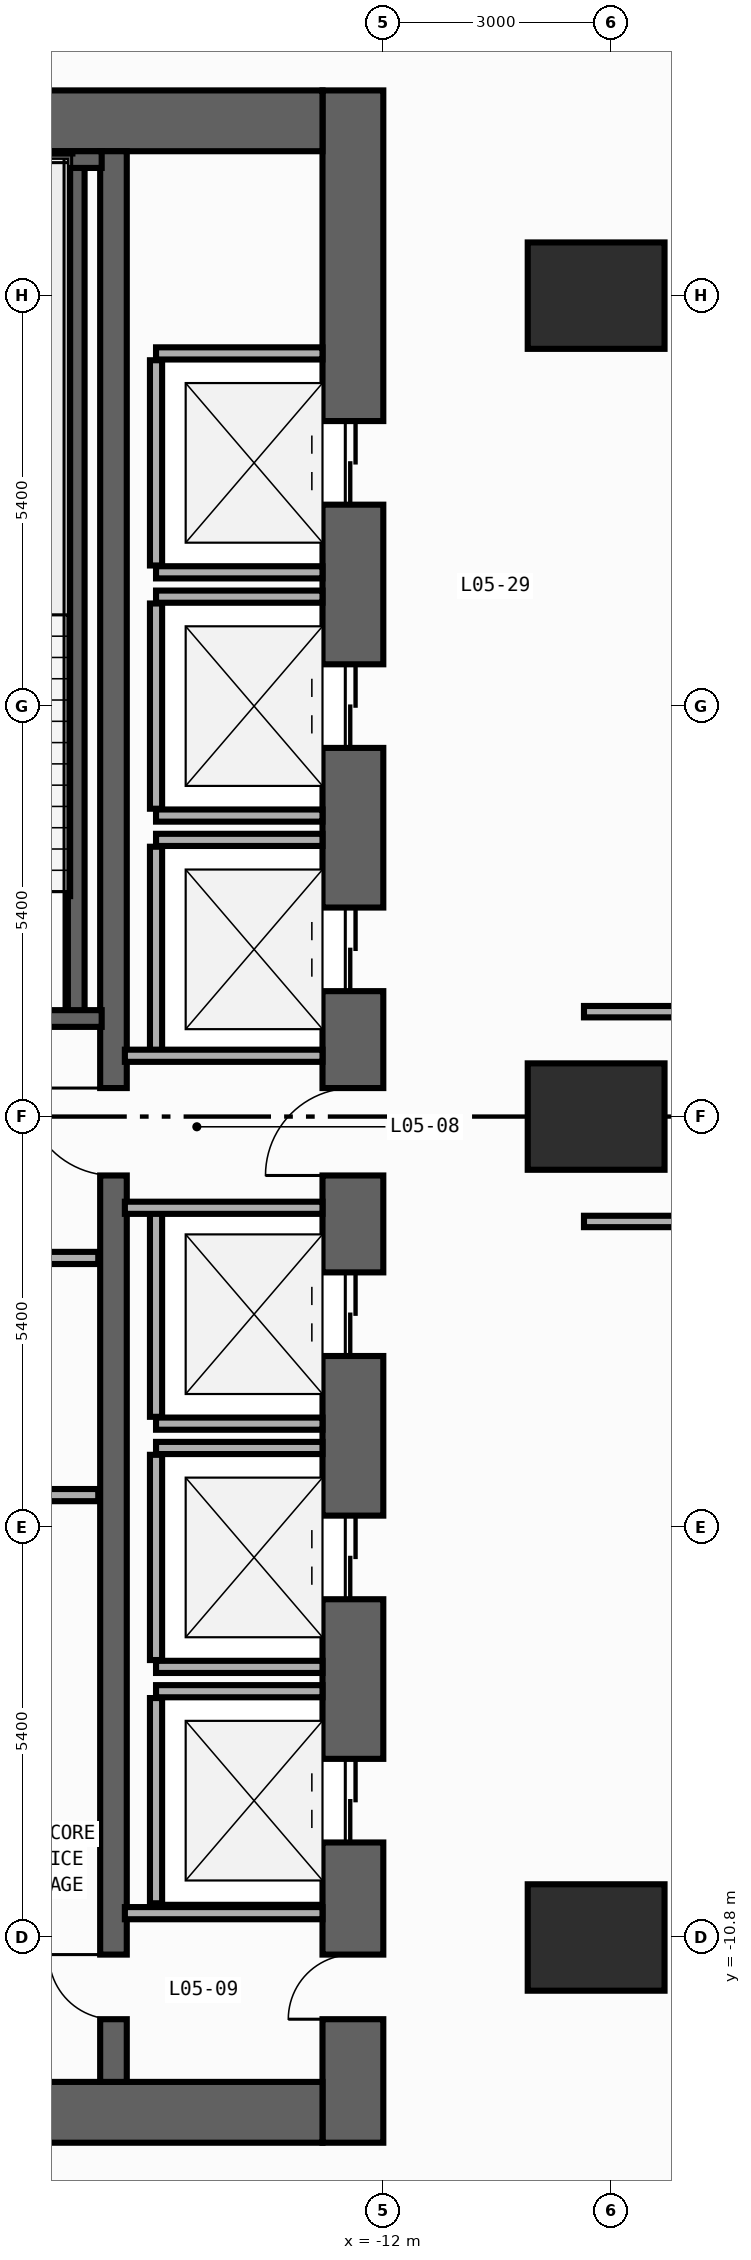
"""IFC4 building model, lengths in metres.
Left out: names, types, materials, properties, quantities, classifications, styles, units other than length and angle.
Written with IfcOpenShell. Run it as: python <this file> out.ifc"""

import sys

from ifc_helpers import new_model, si_unit, direction, frame, frame_2d, origin, origin_2d, place, context, subcontext, project, spatial, rectangle, extrude, element, fill, save


model = new_model("IFC4")
c1 = context("Model", 3, precision=1e-05, world=origin(), true_north=direction((0.0, 1.0)))
c2 = subcontext(c1, "Body", "Model", "MODEL_VIEW")
j1 = project(units=[si_unit("LENGTHUNIT", "METRE"), si_unit("PLANEANGLEUNIT", "RADIAN")], contexts=[c1])
p1 = place(None, origin())
s1 = spatial("IfcSite", under=j1, at=p1, CompositionType="ELEMENT")
p2 = place(p1, origin())
s2 = spatial("IfcBuilding", under=s1, at=p2, CompositionType="ELEMENT")
p3 = place(p2, frame((0.0, 0.0, 21.0)))
s3 = spatial("IfcBuildingStorey", under=s2, at=p3, CompositionType="ELEMENT", Elevation=21.0)
p4 = place(p3, frame((-12.4, -13.5, 0.0), z_axis=(0.0, 0.0, 1.0), x_axis=(0.0, 1.0, 0.0)))
e1 = element("IfcWall", 1, at=p4, inside=s3, PredefinedType="SHEAR", context=c2, shape_type="SweptSolid", body=[
    extrude(rectangle(XDim=27.0, YDim=0.8, at=frame_2d((13.5, 0.0))), origin(), (0.0, 0.0, 1.0), 4.74),
])
p5 = place(p4, frame((21.55, 0.0, 0.0)))
e2 = element("IfcOpeningElement", 2, at=p5, cuts=e1, PredefinedType="OPENING", context=c2, shape_type="SweptSolid", body=[
    extrude(rectangle(XDim=1.1, YDim=2.2, at=frame_2d((0.55, 1.1))), frame((0.0, 0.41, 0.0), z_axis=(0.0, -1.0, 0.0), x_axis=(1.0, 0.0, 0.0)), (0.0, 0.0, 1.0), 0.82),
])
p6 = place(p4, frame((18.35, 0.0, 0.0)))
e3 = element("IfcOpeningElement", 3, at=p6, cuts=e1, PredefinedType="OPENING", context=c2, shape_type="SweptSolid", body=[
    extrude(rectangle(XDim=1.1, YDim=2.2, at=frame_2d((0.55, 1.1))), frame((0.0, 0.41, 0.0), z_axis=(0.0, -1.0, 0.0), x_axis=(1.0, 0.0, 0.0)), (0.0, 0.0, 1.0), 0.82),
])
p7 = place(p4, frame((15.15, 0.0, 0.0)))
e4 = element("IfcOpeningElement", 4, at=p7, cuts=e1, PredefinedType="OPENING", context=c2, shape_type="SweptSolid", body=[
    extrude(rectangle(XDim=1.1, YDim=2.2, at=frame_2d((0.55, 1.1))), frame((0.0, 0.41, 0.0), z_axis=(0.0, -1.0, 0.0), x_axis=(1.0, 0.0, 0.0)), (0.0, 0.0, 1.0), 0.82),
])
p8 = place(p4, frame((10.35, 0.0, 0.0)))
e5 = element("IfcOpeningElement", 5, at=p8, cuts=e1, PredefinedType="OPENING", context=c2, shape_type="SweptSolid", body=[
    extrude(rectangle(XDim=1.1, YDim=2.2, at=frame_2d((0.55, 1.1))), frame((0.0, 0.41, 0.0), z_axis=(0.0, -1.0, 0.0), x_axis=(1.0, 0.0, 0.0)), (0.0, 0.0, 1.0), 0.82),
])
p9 = place(p4, frame((7.15, 0.0, 0.0)))
e6 = element("IfcOpeningElement", 6, at=p9, cuts=e1, PredefinedType="OPENING", context=c2, shape_type="SweptSolid", body=[
    extrude(rectangle(XDim=1.1, YDim=2.2, at=frame_2d((0.55, 1.1))), frame((0.0, 0.41, 0.0), z_axis=(0.0, -1.0, 0.0), x_axis=(1.0, 0.0, 0.0)), (0.0, 0.0, 1.0), 0.82),
])
p10 = place(p4, frame((3.95, 0.0, 0.0)))
e7 = element("IfcOpeningElement", 7, at=p10, cuts=e1, PredefinedType="OPENING", context=c2, shape_type="SweptSolid", body=[
    extrude(rectangle(XDim=1.1, YDim=2.2, at=frame_2d((0.55, 1.1))), frame((0.0, 0.41, 0.0), z_axis=(0.0, -1.0, 0.0), x_axis=(1.0, 0.0, 0.0)), (0.0, 0.0, 1.0), 0.82),
])
p11 = place(p4, frame((12.725, 0.0, 0.0)))
e8 = element("IfcOpeningElement", 8, at=p11, cuts=e1, PredefinedType="OPENING", context=c2, shape_type="SweptSolid", body=[
    extrude(rectangle(XDim=1.15, YDim=2.2, at=frame_2d((0.575, 1.1))), frame((0.0, 0.41, 0.0), z_axis=(0.0, -1.0, 0.0), x_axis=(1.0, 0.0, 0.0)), (0.0, 0.0, 1.0), 0.82),
])
p12 = place(p4, frame((1.625, 0.0, 0.0)))
e9 = element("IfcOpeningElement", 9, at=p12, cuts=e1, PredefinedType="OPENING", context=c2, shape_type="SweptSolid", body=[
    extrude(rectangle(XDim=0.85, YDim=2.1, at=frame_2d((0.425, 1.05))), frame((0.0, 0.41, 0.0), z_axis=(0.0, -1.0, 0.0), x_axis=(1.0, 0.0, 0.0)), (0.0, 0.0, 1.0), 0.82),
])
for number, where, z_axis, x_axis in (
    (10, (-19.6, -13.1, 0.0), (0.0, 0.0, 1.0), (1.0, 0.0, 0.0)),
    (11, (-19.6, 13.1, 0.0), (0.0, 0.0, 1.0), (1.0, 0.0, 0.0)),
):
    element("IfcWall", number, at=place(p3, frame(where, z_axis=z_axis, x_axis=x_axis)), inside=s3, PredefinedType="SHEAR", context=c2, shape_type="SweptSolid", body=[
        extrude(rectangle(XDim=6.8, YDim=0.8, at=frame_2d((3.4, 0.0))), origin(), (0.0, 0.0, 1.0), 4.74),
    ])
p13 = place(p3, frame((-15.55, -12.7, 0.0), z_axis=(0.0, 0.0, 1.0), x_axis=(0.0, 1.0, 0.0)))
e12 = element("IfcWall", 12, at=p13, inside=s3, PredefinedType="SHEAR", context=c2, shape_type="SweptSolid", body=[
    extrude(rectangle(XDim=25.4, YDim=0.35, at=frame_2d((12.7, 0.0))), origin(), (0.0, 0.0, 1.0), 4.74),
])
p14 = place(p13, frame((11.925, 0.0, 0.0)))
e13 = element("IfcOpeningElement", 13, at=p14, cuts=e12, PredefinedType="OPENING", context=c2, shape_type="SweptSolid", body=[
    extrude(rectangle(XDim=1.15, YDim=2.2, at=frame_2d((0.575, 1.1))), frame((0.0, 0.185, 0.0), z_axis=(0.0, -1.0, 0.0), x_axis=(1.0, 0.0, 0.0)), (0.0, 0.0, 1.0), 0.37),
])
p15 = place(p13, frame((0.825, 0.0, 0.0)))
e14 = element("IfcOpeningElement", 14, at=p15, cuts=e12, PredefinedType="OPENING", context=c2, shape_type="SweptSolid", body=[
    extrude(rectangle(XDim=0.85, YDim=2.1, at=frame_2d((0.425, 1.05))), frame((0.0, 0.185, 0.0), z_axis=(0.0, -1.0, 0.0), x_axis=(1.0, 0.0, 0.0)), (0.0, 0.0, 1.0), 0.37),
])
p16 = place(p3, frame((-16.04, 1.29, 0.0), z_axis=(0.0, 0.0, 1.0), x_axis=(0.0, 1.0, 0.0)))
e15 = element("IfcWall", 15, at=p16, inside=s3, PredefinedType="SHEAR", context=c2, shape_type="SweptSolid", body=[
    extrude(rectangle(XDim=11.3, YDim=0.22, at=frame_2d((5.65, 0.0))), origin(), (0.0, 0.0, 1.0), 4.74),
])
p17 = place(p3, frame((-19.62, 12.59, 0.0), z_axis=(0.0, 0.0, 1.0), x_axis=(1.0, 0.0, 0.0)))
e16 = element("IfcWall", 16, at=p17, inside=s3, PredefinedType="SHEAR", context=c2, shape_type="SweptSolid", body=[
    extrude(rectangle(XDim=3.915, YDim=0.22, at=frame_2d((1.958, 0.0))), origin(), (0.0, 0.0, 1.0), 4.74),
])
p18 = place(p3, frame((-19.62, 1.29, 0.0), z_axis=(0.0, 0.0, 1.0), x_axis=(1.0, 0.0, 0.0)))
e17 = element("IfcWall", 17, at=p18, inside=s3, PredefinedType="SHEAR", context=c2, shape_type="SweptSolid", body=[
    extrude(rectangle(XDim=3.915, YDim=0.22, at=frame_2d((1.958, 0.0))), origin(), (0.0, 0.0, 1.0), 4.74),
])
p19 = place(p18, frame((1.08, 0.0, 0.0)))
e18 = element("IfcOpeningElement", 18, at=p19, cuts=e17, PredefinedType="OPENING", context=c2, shape_type="SweptSolid", body=[
    extrude(rectangle(XDim=1.1, YDim=2.2, at=frame_2d((0.55, 1.1))), frame((0.0, 0.12, 0.0), z_axis=(0.0, -1.0, 0.0), x_axis=(1.0, 0.0, 0.0)), (0.0, 0.0, 1.0), 0.24),
])
for number, where, z_axis, x_axis in (
    (19, (-9.2, -10.8, 0.0), (0.0, 0.0, 1.0), (1.0, 0.0, 0.0)),
    (20, (-9.2, 0.0, 0.0), (0.0, 0.0, 1.0), (1.0, 0.0, 0.0)),
    (21, (-9.2, 10.8, 0.0), (0.0, 0.0, 1.0), (1.0, 0.0, 0.0)),
):
    element("IfcColumn", number, at=place(p3, frame(where, z_axis=z_axis, x_axis=x_axis)), inside=s3, PredefinedType="COLUMN", context=c2, shape_type="SweptSolid", body=[
        extrude(rectangle(XDim=1.8, YDim=1.4, at=origin_2d()), origin(), (0.0, 0.0, 1.0), 5.0),
    ])
for number, where, z_axis, x_axis in (
    (22, (-14.99, 7.16, 0.0), (0.0, 0.0, 1.0), (1.0, 0.0, 0.0)),
    (23, (-14.99, 10.04, 0.0), (0.0, 0.0, 1.0), (1.0, 0.0, 0.0)),
):
    element("IfcWall", number, at=place(p3, frame(where, z_axis=z_axis, x_axis=x_axis)), inside=s3, PredefinedType="STANDARD", context=c2, shape_type="SweptSolid", body=[
        extrude(rectangle(XDim=2.19, YDim=0.16, at=frame_2d((1.095, 0.0))), origin(), (0.0, 0.0, 1.0), 4.74),
    ])
p20 = place(p3, frame((-14.99, 7.25, 0.0), z_axis=(0.0, 0.0, 1.0), x_axis=(0.0, 1.0, 0.0)))
e24 = element("IfcWall", 24, at=p20, inside=s3, PredefinedType="STANDARD", context=c2, shape_type="SweptSolid", body=[
    extrude(rectangle(XDim=2.7, YDim=0.16, at=frame_2d((1.35, 0.0))), origin(), (0.0, 0.0, 1.0), 4.74),
])
for number, where, z_axis, x_axis in (
    (25, (-14.99, 3.96, 0.0), (0.0, 0.0, 1.0), (1.0, 0.0, 0.0)),
    (26, (-14.99, 6.84, 0.0), (0.0, 0.0, 1.0), (1.0, 0.0, 0.0)),
):
    element("IfcWall", number, at=place(p3, frame(where, z_axis=z_axis, x_axis=x_axis)), inside=s3, PredefinedType="STANDARD", context=c2, shape_type="SweptSolid", body=[
        extrude(rectangle(XDim=2.19, YDim=0.16, at=frame_2d((1.095, 0.0))), origin(), (0.0, 0.0, 1.0), 4.74),
    ])
p21 = place(p3, frame((-14.99, 4.05, 0.0), z_axis=(0.0, 0.0, 1.0), x_axis=(0.0, 1.0, 0.0)))
e27 = element("IfcWall", 27, at=p21, inside=s3, PredefinedType="STANDARD", context=c2, shape_type="SweptSolid", body=[
    extrude(rectangle(XDim=2.7, YDim=0.16, at=frame_2d((1.35, 0.0))), origin(), (0.0, 0.0, 1.0), 4.74),
])
p22 = place(p3, frame((-14.99, 3.64, 0.0), z_axis=(0.0, 0.0, 1.0), x_axis=(1.0, 0.0, 0.0)))
e28 = element("IfcWall", 28, at=p22, inside=s3, PredefinedType="STANDARD", context=c2, shape_type="SweptSolid", body=[
    extrude(rectangle(XDim=2.19, YDim=0.16, at=frame_2d((1.095, 0.0))), origin(), (0.0, 0.0, 1.0), 4.74),
])
p23 = place(p3, frame((-14.99, 0.85, 0.0), z_axis=(0.0, 0.0, 1.0), x_axis=(0.0, 1.0, 0.0)))
e29 = element("IfcWall", 29, at=p23, inside=s3, PredefinedType="STANDARD", context=c2, shape_type="SweptSolid", body=[
    extrude(rectangle(XDim=2.7, YDim=0.16, at=frame_2d((1.35, 0.0))), origin(), (0.0, 0.0, 1.0), 4.74),
])
p24 = place(p3, frame((-14.99, -4.04, 0.0), z_axis=(0.0, 0.0, 1.0), x_axis=(1.0, 0.0, 0.0)))
e30 = element("IfcWall", 30, at=p24, inside=s3, PredefinedType="STANDARD", context=c2, shape_type="SweptSolid", body=[
    extrude(rectangle(XDim=2.19, YDim=0.16, at=frame_2d((1.095, 0.0))), origin(), (0.0, 0.0, 1.0), 4.74),
])
p25 = place(p3, frame((-14.99, -3.95, 0.0), z_axis=(0.0, 0.0, 1.0), x_axis=(0.0, 1.0, 0.0)))
e31 = element("IfcWall", 31, at=p25, inside=s3, PredefinedType="STANDARD", context=c2, shape_type="SweptSolid", body=[
    extrude(rectangle(XDim=2.7, YDim=0.16, at=frame_2d((1.35, 0.0))), origin(), (0.0, 0.0, 1.0), 4.74),
])
for number, where, z_axis, x_axis in (
    (32, (-14.99, -7.24, 0.0), (0.0, 0.0, 1.0), (1.0, 0.0, 0.0)),
    (33, (-14.99, -4.36, 0.0), (0.0, 0.0, 1.0), (1.0, 0.0, 0.0)),
):
    element("IfcWall", number, at=place(p3, frame(where, z_axis=z_axis, x_axis=x_axis)), inside=s3, PredefinedType="STANDARD", context=c2, shape_type="SweptSolid", body=[
        extrude(rectangle(XDim=2.19, YDim=0.16, at=frame_2d((1.095, 0.0))), origin(), (0.0, 0.0, 1.0), 4.74),
    ])
p26 = place(p3, frame((-14.99, -7.15, 0.0), z_axis=(0.0, 0.0, 1.0), x_axis=(0.0, 1.0, 0.0)))
e34 = element("IfcWall", 34, at=p26, inside=s3, PredefinedType="STANDARD", context=c2, shape_type="SweptSolid", body=[
    extrude(rectangle(XDim=2.7, YDim=0.16, at=frame_2d((1.35, 0.0))), origin(), (0.0, 0.0, 1.0), 4.74),
])
p27 = place(p3, frame((-14.99, -7.56, 0.0), z_axis=(0.0, 0.0, 1.0), x_axis=(1.0, 0.0, 0.0)))
e35 = element("IfcWall", 35, at=p27, inside=s3, PredefinedType="STANDARD", context=c2, shape_type="SweptSolid", body=[
    extrude(rectangle(XDim=2.19, YDim=0.16, at=frame_2d((1.095, 0.0))), origin(), (0.0, 0.0, 1.0), 4.74),
])
p28 = place(p3, frame((-14.99, -10.35, 0.0), z_axis=(0.0, 0.0, 1.0), x_axis=(0.0, 1.0, 0.0)))
e36 = element("IfcWall", 36, at=p28, inside=s3, PredefinedType="STANDARD", context=c2, shape_type="SweptSolid", body=[
    extrude(rectangle(XDim=2.7, YDim=0.16, at=frame_2d((1.35, 0.0))), origin(), (0.0, 0.0, 1.0), 4.74),
])
p29 = place(p3, frame((-19.55, -1.86, 0.0), z_axis=(0.0, 0.0, 1.0), x_axis=(1.0, 0.0, 0.0)))
e37 = element("IfcWall", 37, at=p29, inside=s3, PredefinedType="STANDARD", context=c2, shape_type="SweptSolid", body=[
    extrude(rectangle(XDim=3.8, YDim=0.16, at=frame_2d((1.9, 0.0))), origin(), (0.0, 0.0, 1.0), 4.74),
])
p30 = place(p29, frame((1.18, 0.0, 0.0)))
e38 = element("IfcOpeningElement", 38, at=p30, cuts=e37, PredefinedType="OPENING", context=c2, shape_type="SweptSolid", body=[
    extrude(rectangle(XDim=1.15, YDim=2.2, at=frame_2d((0.575, 1.1))), frame((0.0, 0.09, 0.0), z_axis=(0.0, -1.0, 0.0), x_axis=(1.0, 0.0, 0.0)), (0.0, 0.0, 1.0), 0.18),
])
p31 = place(p3, frame((-19.55, -4.98, 0.0), z_axis=(0.0, 0.0, 1.0), x_axis=(1.0, 0.0, 0.0)))
e39 = element("IfcWall", 39, at=p31, inside=s3, PredefinedType="STANDARD", context=c2, shape_type="SweptSolid", body=[
    extrude(rectangle(XDim=3.8, YDim=0.16, at=frame_2d((1.9, 0.0))), origin(), (0.0, 0.0, 1.0), 4.74),
])
for number, where, z_axis, x_axis in (
    (40, (-15.4, 0.8, 0.0), (0.0, 0.0, 1.0), (1.0, 0.0, 0.0)),
    (41, (-15.4, -1.2, 0.0), (0.0, 0.0, 1.0), (1.0, 0.0, 0.0)),
    (42, (-15.4, -10.48, 0.0), (0.0, 0.0, 1.0), (1.0, 0.0, 0.0)),
):
    element("IfcWall", number, at=place(p3, frame(where, z_axis=z_axis, x_axis=x_axis)), inside=s3, PredefinedType="STANDARD", context=c2, shape_type="SweptSolid", body=[
        extrude(rectangle(XDim=2.6, YDim=0.16, at=frame_2d((1.3, 0.0))), origin(), (0.0, 0.0, 1.0), 4.74),
    ])
p32 = place(p3, frame((-9.36, 1.38, 0.0), z_axis=(0.0, 0.0, 1.0), x_axis=(1.0, 0.0, 0.0)))
e43 = element("IfcWall", 43, at=p32, inside=s3, PredefinedType="PARTITIONING", context=c2, shape_type="SweptSolid", body=[
    extrude(rectangle(XDim=18.471, YDim=0.15, at=frame_2d((9.235, 0.0))), origin(), (0.0, 0.0, 1.0), 4.74),
])
p33 = place(p32, frame((8.886, 0.0, 0.0)))
e44 = element("IfcOpeningElement", 44, at=p33, cuts=e43, PredefinedType="OPENING", context=c2, shape_type="SweptSolid", body=[
    extrude(rectangle(XDim=0.9, YDim=2.15, at=frame_2d((0.45, 1.075))), frame((0.0, 0.085, 0.0), z_axis=(0.0, -1.0, 0.0), x_axis=(1.0, 0.0, 0.0)), (0.0, 0.0, 1.0), 0.17),
])
p34 = place(p3, frame((-9.36, -1.38, 0.0), z_axis=(0.0, 0.0, 1.0), x_axis=(1.0, 0.0, 0.0)))
e45 = element("IfcWall", 45, at=p34, inside=s3, PredefinedType="PARTITIONING", context=c2, shape_type="SweptSolid", body=[
    extrude(rectangle(XDim=18.72, YDim=0.15, at=frame_2d((9.36, 0.0))), origin(), (0.0, 0.0, 1.0), 4.74),
])
p35 = place(p34, frame((8.91, 0.0, 0.0)))
e46 = element("IfcOpeningElement", 46, at=p35, cuts=e45, PredefinedType="OPENING", context=c2, shape_type="SweptSolid", body=[
    extrude(rectangle(XDim=0.9, YDim=2.15, at=frame_2d((0.45, 1.075))), frame((0.0, 0.085, 0.0), z_axis=(0.0, -1.0, 0.0), x_axis=(1.0, 0.0, 0.0)), (0.0, 0.0, 1.0), 0.17),
])
p36 = place(p5, origin())
e47 = element("IfcDoor", 47, at=p36, inside=s3, OperationType="DOUBLE_DOOR_SLIDING", PredefinedType="DOOR", context=c2, shape_type="SweptSolid", body=[
    extrude(rectangle(XDim=1.1, YDim=2.2, at=frame_2d((0.55, 1.1))), frame((0.0, 0.025, 0.0), z_axis=(0.0, -1.0, 0.0), x_axis=(1.0, 0.0, 0.0)), (0.0, 0.0, 1.0), 0.05),
])
fill(e2, e47)
p37 = place(p6, origin())
e48 = element("IfcDoor", 48, at=p37, inside=s3, OperationType="DOUBLE_DOOR_SLIDING", PredefinedType="DOOR", context=c2, shape_type="SweptSolid", body=[
    extrude(rectangle(XDim=1.1, YDim=2.2, at=frame_2d((0.55, 1.1))), frame((0.0, 0.025, 0.0), z_axis=(0.0, -1.0, 0.0), x_axis=(1.0, 0.0, 0.0)), (0.0, 0.0, 1.0), 0.05),
])
fill(e3, e48)
p38 = place(p7, origin())
e49 = element("IfcDoor", 49, at=p38, inside=s3, OperationType="DOUBLE_DOOR_SLIDING", PredefinedType="DOOR", context=c2, shape_type="SweptSolid", body=[
    extrude(rectangle(XDim=1.1, YDim=2.2, at=frame_2d((0.55, 1.1))), frame((0.0, 0.025, 0.0), z_axis=(0.0, -1.0, 0.0), x_axis=(1.0, 0.0, 0.0)), (0.0, 0.0, 1.0), 0.05),
])
fill(e4, e49)
p39 = place(p8, origin())
e50 = element("IfcDoor", 50, at=p39, inside=s3, OperationType="DOUBLE_DOOR_SLIDING", PredefinedType="DOOR", context=c2, shape_type="SweptSolid", body=[
    extrude(rectangle(XDim=1.1, YDim=2.2, at=frame_2d((0.55, 1.1))), frame((0.0, 0.025, 0.0), z_axis=(0.0, -1.0, 0.0), x_axis=(1.0, 0.0, 0.0)), (0.0, 0.0, 1.0), 0.05),
])
fill(e5, e50)
p40 = place(p9, origin())
e51 = element("IfcDoor", 51, at=p40, inside=s3, OperationType="DOUBLE_DOOR_SLIDING", PredefinedType="DOOR", context=c2, shape_type="SweptSolid", body=[
    extrude(rectangle(XDim=1.1, YDim=2.2, at=frame_2d((0.55, 1.1))), frame((0.0, 0.025, 0.0), z_axis=(0.0, -1.0, 0.0), x_axis=(1.0, 0.0, 0.0)), (0.0, 0.0, 1.0), 0.05),
])
fill(e6, e51)
p41 = place(p10, origin())
e52 = element("IfcDoor", 52, at=p41, inside=s3, OperationType="DOUBLE_DOOR_SLIDING", PredefinedType="DOOR", context=c2, shape_type="SweptSolid", body=[
    extrude(rectangle(XDim=1.1, YDim=2.2, at=frame_2d((0.55, 1.1))), frame((0.0, 0.025, 0.0), z_axis=(0.0, -1.0, 0.0), x_axis=(1.0, 0.0, 0.0)), (0.0, 0.0, 1.0), 0.05),
])
fill(e7, e52)
p42 = place(p11, origin())
e53 = element("IfcDoor", 53, at=p42, inside=s3, OperationType="SINGLE_SWING_LEFT", PredefinedType="DOOR", context=c2, shape_type="SweptSolid", body=[
    extrude(rectangle(XDim=1.15, YDim=2.2, at=frame_2d((0.575, 1.1))), frame((0.0, 0.025, 0.0), z_axis=(0.0, -1.0, 0.0), x_axis=(1.0, 0.0, 0.0)), (0.0, 0.0, 1.0), 0.05),
])
fill(e8, e53)
p43 = place(p14, origin())
e54 = element("IfcDoor", 54, at=p43, inside=s3, OperationType="SINGLE_SWING_RIGHT", PredefinedType="DOOR", context=c2, shape_type="SweptSolid", body=[
    extrude(rectangle(XDim=1.15, YDim=2.2, at=frame_2d((0.575, 1.1))), frame((0.0, 0.025, 0.0), z_axis=(0.0, -1.0, 0.0), x_axis=(1.0, 0.0, 0.0)), (0.0, 0.0, 1.0), 0.05),
])
fill(e13, e54)
p44 = place(p12, origin())
e55 = element("IfcDoor", 55, at=p44, inside=s3, OperationType="SINGLE_SWING_LEFT", PredefinedType="DOOR", context=c2, shape_type="SweptSolid", body=[
    extrude(rectangle(XDim=0.85, YDim=2.1, at=frame_2d((0.425, 1.05))), frame((0.0, 0.025, 0.0), z_axis=(0.0, -1.0, 0.0), x_axis=(1.0, 0.0, 0.0)), (0.0, 0.0, 1.0), 0.05),
])
fill(e9, e55)
p45 = place(p15, origin())
e56 = element("IfcDoor", 56, at=p45, inside=s3, OperationType="SINGLE_SWING_RIGHT", PredefinedType="DOOR", context=c2, shape_type="SweptSolid", body=[
    extrude(rectangle(XDim=0.85, YDim=2.1, at=frame_2d((0.425, 1.05))), frame((0.0, 0.025, 0.0), z_axis=(0.0, -1.0, 0.0), x_axis=(1.0, 0.0, 0.0)), (0.0, 0.0, 1.0), 0.05),
])
fill(e14, e56)
save(model, sys.argv[1])
